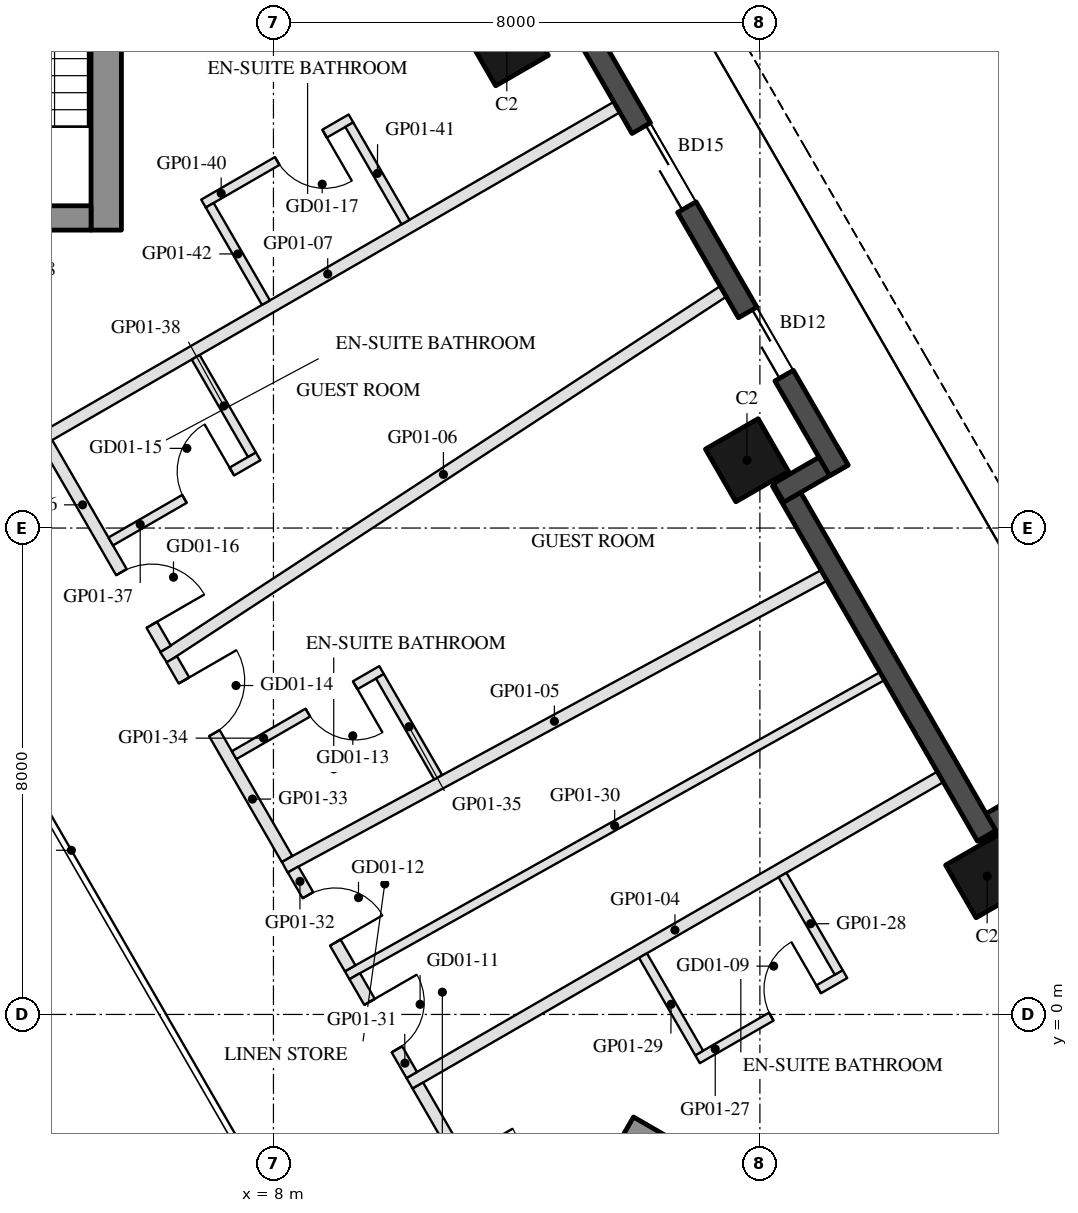
"""IFC4 building model, lengths in metres.
Left out: names, types, materials, properties, quantities, classifications, styles, units other than length and angle.
Written with IfcOpenShell. Run it as: python <this file> out.ifc"""

import sys

from ifc_helpers import new_model, si_unit, direction, frame, frame_2d, origin, origin_2d, place, context, subcontext, project, spatial, rectangle, hollow_rectangle, extrude, element, fill, save


model = new_model("IFC4")
c1 = context("Model", 3, precision=1e-05, world=origin(), true_north=direction((0.0, 1.0)))
c2 = subcontext(c1, "Body", "Model", "MODEL_VIEW")
j1 = project(units=[si_unit("LENGTHUNIT", "METRE"), si_unit("PLANEANGLEUNIT", "RADIAN")], contexts=[c1])
p1 = place(None, origin())
s1 = spatial("IfcSite", under=j1, at=p1, CompositionType="ELEMENT")
p2 = place(p1, origin())
s2 = spatial("IfcBuilding", under=s1, at=p2, CompositionType="ELEMENT")
p3 = place(p2, frame((0.0, 0.0, 50.2)))
s3 = spatial("IfcBuildingStorey", under=s2, at=p3, CompositionType="ELEMENT", Elevation=50.2)
for number, where, z_axis, x_axis in (
    (1, (19.738, 2.273, 0.0), (0.0, 0.0, 1.0), (-0.5, 0.866, 0.0)),
    (2, (15.788, 9.115, 0.0), (0.0, 0.0, 1.0), (-0.5, 0.866, 0.0)),
    (3, (11.838, 15.957, 0.0), (0.0, 0.0, 1.0), (-0.5, 0.866, 0.0)),
):
    element("IfcColumn", number, at=place(p3, frame(where, z_axis=z_axis, x_axis=x_axis)), inside=s3, PredefinedType="COLUMN", context=c2, shape_type="SweptSolid", body=[
        extrude(hollow_rectangle(XDim=1.0, YDim=1.0, WallThickness=0.045, at=origin_2d()), origin(), (0.0, 0.0, 1.0), 3.7),
    ])
p4 = place(p3, frame((20.588, 3.601, 0.0), z_axis=(0.0, 0.0, 1.0), x_axis=(-0.866005645448, -0.500034220881, 0.0)))
e4 = element("IfcWall", 4, at=p4, inside=s3, PredefinedType="SOLIDWALL", context=c2, shape_type="SweptSolid", body=[
    extrude(rectangle(XDim=1.22, YDim=0.35, at=frame_2d((0.61, 0.0))), origin(), (0.0, 0.0, 1.0), 3.55),
])
p5 = place(p3, frame((19.729, 2.938, 0.0), z_axis=(0.0, 0.0, 1.0), x_axis=(-0.499976430342, 0.866039011305, 0.0)))
e5 = element("IfcWall", 5, at=p5, inside=s3, PredefinedType="SOLIDWALL", context=c2, shape_type="SweptSolid", body=[
    extrude(rectangle(XDim=6.74, YDim=0.35, at=frame_2d((3.37, 0.0))), origin(), (0.0, 0.0, 1.0), 3.55),
])
p6 = place(p3, frame((16.306, 8.577, 0.0), z_axis=(0.0, 0.0, 1.0), x_axis=(0.866092288191, 0.499884134912, 0.0)))
e6 = element("IfcWall", 6, at=p6, inside=s3, PredefinedType="SOLIDWALL", context=c2, shape_type="SweptSolid", body=[
    extrude(rectangle(XDim=1.22, YDim=0.35, at=frame_2d((0.61, 0.0))), origin(), (0.0, 0.0, 1.0), 3.55),
])
p7 = place(p3, frame((17.299, 8.948, 0.0), z_axis=(0.0, 0.0, 1.0), x_axis=(-0.500010041276, 0.866019606374, 0.0)))
e7 = element("IfcWall", 7, at=p7, inside=s3, PredefinedType="SOLIDWALL", context=c2, shape_type="SweptSolid", body=[
    extrude(rectangle(XDim=9.7, YDim=0.35, at=frame_2d((4.85, 0.0))), origin(), (0.0, 0.0, 1.0), 3.55),
])
p8 = place(p7, frame((1.8, 0.0, 0.0)))
e8 = element("IfcOpeningElement", 8, at=p8, cuts=e7, PredefinedType="OPENING", context=c2, shape_type="SweptSolid", body=[
    extrude(rectangle(XDim=1.2, YDim=2.4, at=frame_2d((0.6, 1.2))), frame((0.0, 0.185, 0.0), z_axis=(0.0, -1.0, 0.0), x_axis=(1.0, 0.0, 0.0)), (0.0, 0.0, 1.0), 0.37),
])
p9 = place(p7, frame((5.0, 0.0, 0.0)))
e9 = element("IfcOpeningElement", 9, at=p9, cuts=e7, PredefinedType="OPENING", context=c2, shape_type="SweptSolid", body=[
    extrude(rectangle(XDim=1.5, YDim=2.4, at=frame_2d((0.75, 1.2))), frame((0.0, 0.185, 0.0), z_axis=(0.0, -1.0, 0.0), x_axis=(1.0, 0.0, 0.0)), (0.0, 0.0, 1.0), 0.37),
])
p10 = place(p3, frame((5.25, 12.9, 0.0), z_axis=(0.0, 0.0, 1.0), x_axis=(0.0, 1.0, 0.0)))
e10 = element("IfcWall", 10, at=p10, inside=s3, PredefinedType="SHEAR", context=c2, shape_type="SweptSolid", body=[
    extrude(rectangle(XDim=14.837, YDim=0.5, at=frame_2d((7.418, 0.0))), origin(), (0.0, 0.0, 1.0), 3.5),
])
p11 = place(p3, frame((5.0, 13.1, 0.0), z_axis=(0.0, 0.0, 1.0), x_axis=(-1.0, 0.0, 0.0)))
e11 = element("IfcWall", 11, at=p11, inside=s3, PredefinedType="SHEAR", context=c2, shape_type="SweptSolid", body=[
    extrude(rectangle(XDim=10.0, YDim=0.4, at=frame_2d((5.0, 0.0))), origin(), (0.0, 0.0, 1.0), 3.5),
])
p12 = place(p11, frame((3.55, 0.0, 0.0)))
e12 = element("IfcOpeningElement", 12, at=p12, cuts=e11, PredefinedType="OPENING", context=c2, shape_type="SweptSolid", body=[
    extrude(rectangle(XDim=1.1, YDim=2.1, at=frame_2d((0.55, 1.05))), frame((0.0, 0.21, 0.0), z_axis=(0.0, -1.0, 0.0), x_axis=(1.0, 0.0, 0.0)), (0.0, 0.0, 1.0), 0.42),
])
p13 = place(p11, frame((5.85, 0.0, 0.0)))
e13 = element("IfcOpeningElement", 13, at=p13, cuts=e11, PredefinedType="OPENING", context=c2, shape_type="SweptSolid", body=[
    extrude(rectangle(XDim=1.4, YDim=2.1, at=frame_2d((0.7, 1.05))), frame((0.0, 0.21, 0.0), z_axis=(0.0, -1.0, 0.0), x_axis=(1.0, 0.0, 0.0)), (0.0, 0.0, 1.0), 0.42),
])
p14 = place(p3, frame((13.797, -1.903, 0.0), z_axis=(0.0, 0.0, 1.0), x_axis=(0.866025009528, -0.500000682871, 0.0)))
e14 = element("IfcWall", 14, at=p14, inside=s3, PredefinedType="SHEAR", context=c2, shape_type="SweptSolid", body=[
    extrude(rectangle(XDim=14.837, YDim=0.5, at=frame_2d((7.418, 0.0))), origin(), (0.0, 0.0, 1.0), 3.5),
])
p15 = place(p3, frame((18.968, 3.907, 0.0), z_axis=(0.0, 0.0, 1.0), x_axis=(-0.866022637375, -0.500004791531, 0.0)))
e15 = element("IfcWall", 15, at=p15, inside=s3, PredefinedType="PARTITIONING", context=c2, shape_type="SweptSolid", body=[
    extrude(rectangle(XDim=10.08, YDim=0.2, at=frame_2d((5.04, 0.0))), origin(), (0.0, 0.0, 1.0), 2.96),
])
p16 = place(p3, frame((17.055, 7.22, 0.0), z_axis=(0.0, 0.0, 1.0), x_axis=(-0.87960357017, -0.475707430407, 0.0)))
e16 = element("IfcWall", 16, at=p16, inside=s3, PredefinedType="PARTITIONING", context=c2, shape_type="SweptSolid", body=[
    extrude(rectangle(XDim=10.084, YDim=0.2, at=frame_2d((5.042, 0.0))), origin(), (0.0, 0.0, 1.0), 2.96),
])
p17 = place(p3, frame((15.397, 11.892, 0.0), z_axis=(0.0, 0.0, 1.0), x_axis=(-0.836898817878, -0.547357624076, 0.0)))
e17 = element("IfcWall", 17, at=p17, inside=s3, PredefinedType="PARTITIONING", context=c2, shape_type="SweptSolid", body=[
    extrude(rectangle(XDim=10.997, YDim=0.2, at=frame_2d((5.499, 0.0))), origin(), (0.0, 0.0, 1.0), 2.96),
])
p18 = place(p3, frame((13.647, 14.923, 0.0), z_axis=(0.0, 0.0, 1.0), x_axis=(-0.866027479907, -0.499996404033, 0.0)))
e18 = element("IfcWall", 18, at=p18, inside=s3, PredefinedType="PARTITIONING", context=c2, shape_type="SweptSolid", body=[
    extrude(rectangle(XDim=10.98, YDim=0.2, at=frame_2d((5.49, 0.0))), origin(), (0.0, 0.0, 1.0), 2.96),
])
p19 = place(p3, frame((10.375, -1.169, 0.0), z_axis=(0.0, 0.0, 1.0), x_axis=(0.500055316652, -0.865993464345, 0.0)))
e19 = element("IfcWall", 19, at=p19, inside=s3, PredefinedType="PARTITIONING", context=c2, shape_type="SweptSolid", body=[
    extrude(rectangle(XDim=3.788, YDim=0.2, at=frame_2d((1.894, 0.0))), origin(), (0.0, 0.0, 1.0), 2.95),
])
p20 = place(p19, frame((1.394, 0.0, 0.0)))
e20 = element("IfcOpeningElement", 20, at=p20, cuts=e19, PredefinedType="OPENING", context=c2, shape_type="SweptSolid", body=[
    extrude(rectangle(XDim=1.0, YDim=2.1, at=frame_2d((0.5, 1.05))), frame((0.0, 0.11, 0.0), z_axis=(0.0, -1.0, 0.0), x_axis=(1.0, 0.0, 0.0)), (0.0, 0.0, 1.0), 0.22),
])
p21 = place(p3, frame((14.974, -0.737, 0.0), z_axis=(0.0, 0.0, 1.0), x_axis=(0.866018616679, 0.500011755427, 0.0)))
e21 = element("IfcWall", 21, at=p21, inside=s3, PredefinedType="PARTITIONING", context=c2, shape_type="SweptSolid", body=[
    extrude(rectangle(XDim=2.8, YDim=0.15, at=frame_2d((1.4, 0.0))), origin(), (0.0, 0.0, 1.0), 3.55),
])
p22 = place(p21, frame((1.4, 0.0, 0.0)))
e22 = element("IfcOpeningElement", 22, at=p22, cuts=e21, PredefinedType="OPENING", context=c2, shape_type="SweptSolid", body=[
    extrude(rectangle(XDim=0.9, YDim=2.1, at=frame_2d((0.45, 1.05))), frame((0.0, 0.085, 0.0), z_axis=(0.0, -1.0, 0.0), x_axis=(1.0, 0.0, 0.0)), (0.0, 0.0, 1.0), 0.17),
])
p23 = place(p3, frame((17.297, 0.691, 0.0), z_axis=(0.0, 0.0, 1.0), x_axis=(-0.499985172903, 0.866033964044, 0.0)))
e23 = element("IfcWall", 23, at=p23, inside=s3, PredefinedType="PARTITIONING", context=c2, shape_type="SweptSolid", body=[
    extrude(rectangle(XDim=1.85, YDim=0.15, at=frame_2d((0.925, 0.0))), origin(), (0.0, 0.0, 1.0), 2.95),
])
p24 = place(p3, frame((15.002, -0.634, 0.0), z_axis=(0.0, 0.0, 1.0), x_axis=(-0.500042316284, 0.866000971088, 0.0)))
e24 = element("IfcWall", 24, at=p24, inside=s3, PredefinedType="PARTITIONING", context=c2, shape_type="SweptSolid", body=[
    extrude(rectangle(XDim=1.85, YDim=0.15, at=frame_2d((0.925, 0.0))), origin(), (0.0, 0.0, 1.0), 2.95),
])
p25 = place(p3, frame((18.011, 5.563, 0.0), z_axis=(0.0, 0.0, 1.0), x_axis=(-0.872898889426, -0.487901146585, 0.0)))
e25 = element("IfcWall", 25, at=p25, inside=s3, PredefinedType="PARTITIONING", context=c2, shape_type="SweptSolid", body=[
    extrude(rectangle(XDim=10.081, YDim=0.15, at=frame_2d((5.041, 0.0))), origin(), (0.0, 0.0, 1.0), 2.95),
])
p26 = place(p3, frame((9.336, 0.629, 0.0), z_axis=(0.0, 0.0, 1.0), x_axis=(0.500015282227, -0.866016580407, 0.0)))
e26 = element("IfcWall", 26, at=p26, inside=s3, PredefinedType="PARTITIONING", context=c2, shape_type="SweptSolid", body=[
    extrude(rectangle(XDim=1.876, YDim=0.2, at=frame_2d((0.938, 0.0))), origin(), (0.0, 0.0, 1.0), 3.55),
])
p27 = place(p26, frame((0.488, 0.0, 0.0)))
e27 = element("IfcOpeningElement", 27, at=p27, cuts=e26, PredefinedType="OPENING", context=c2, shape_type="SweptSolid", body=[
    extrude(rectangle(XDim=0.9, YDim=2.1, at=frame_2d((0.45, 1.05))), frame((0.0, 0.11, 0.0), z_axis=(0.0, -1.0, 0.0), x_axis=(1.0, 0.0, 0.0)), (0.0, 0.0, 1.0), 0.22),
])
p28 = place(p3, frame((8.323, 2.384, 0.0), z_axis=(0.0, 0.0, 1.0), x_axis=(0.500015282227, -0.866016580407, 0.0)))
e28 = element("IfcWall", 28, at=p28, inside=s3, PredefinedType="PARTITIONING", context=c2, shape_type="SweptSolid", body=[
    extrude(rectangle(XDim=1.876, YDim=0.2, at=frame_2d((0.938, 0.0))), origin(), (0.0, 0.0, 1.0), 2.95),
])
p29 = place(p28, frame((0.488, 0.0, 0.0)))
e29 = element("IfcOpeningElement", 29, at=p29, cuts=e28, PredefinedType="OPENING", context=c2, shape_type="SweptSolid", body=[
    extrude(rectangle(XDim=0.9, YDim=2.1, at=frame_2d((0.45, 1.05))), frame((0.0, 0.11, 0.0), z_axis=(0.0, -1.0, 0.0), x_axis=(1.0, 0.0, 0.0)), (0.0, 0.0, 1.0), 0.22),
])
p30 = place(p3, frame((6.327, 5.841, 0.0), z_axis=(0.0, 0.0, 1.0), x_axis=(0.499982560684, -0.866035472144, 0.0)))
e30 = element("IfcWall", 30, at=p30, inside=s3, PredefinedType="PARTITIONING", context=c2, shape_type="SweptSolid", body=[
    extrude(rectangle(XDim=3.792, YDim=0.2, at=frame_2d((1.896, 0.0))), origin(), (0.0, 0.0, 1.0), 2.95),
])
p31 = place(p30, frame((0.401, 0.0, 0.0)))
e31 = element("IfcOpeningElement", 31, at=p31, cuts=e30, PredefinedType="OPENING", context=c2, shape_type="SweptSolid", body=[
    extrude(rectangle(XDim=1.0, YDim=2.1, at=frame_2d((0.5, 1.05))), frame((0.0, 0.11, 0.0), z_axis=(0.0, -1.0, 0.0), x_axis=(1.0, 0.0, 0.0)), (0.0, 0.0, 1.0), 0.22),
])
p32 = place(p3, frame((9.778, 5.664, 0.0), z_axis=(0.0, 0.0, 1.0), x_axis=(-0.866034573852, -0.49998411664, 0.0)))
e32 = element("IfcWall", 32, at=p32, inside=s3, PredefinedType="PARTITIONING", context=c2, shape_type="SweptSolid", body=[
    extrude(rectangle(XDim=2.8, YDim=0.15, at=frame_2d((1.4, 0.0))), origin(), (0.0, 0.0, 1.0), 2.95),
])
p33 = place(p32, frame((0.5, 0.0, 0.0)))
e33 = element("IfcOpeningElement", 33, at=p33, cuts=e32, PredefinedType="OPENING", context=c2, shape_type="SweptSolid", body=[
    extrude(rectangle(XDim=0.9, YDim=2.1, at=frame_2d((0.45, 1.05))), frame((0.0, 0.085, 0.0), z_axis=(0.0, -1.0, 0.0), x_axis=(1.0, 0.0, 0.0)), (0.0, 0.0, 1.0), 0.17),
])
p34 = place(p3, frame((10.709, 3.901, 0.0), z_axis=(0.0, 0.0, 1.0), x_axis=(-0.499946593449, 0.866056235875, 0.0)))
e34 = element("IfcWall", 34, at=p34, inside=s3, PredefinedType="PARTITIONING", context=c2, shape_type="SweptSolid", body=[
    extrude(rectangle(XDim=1.917, YDim=0.15, at=frame_2d((0.958, 0.0))), origin(), (0.0, 0.0, 1.0), 2.95),
])
p35 = place(p3, frame((4.275, 9.396, 0.0), z_axis=(0.0, 0.0, 1.0), x_axis=(0.499971370958, -0.866041932139, 0.0)))
e35 = element("IfcWall", 35, at=p35, inside=s3, PredefinedType="PARTITIONING", context=c2, shape_type="SweptSolid", body=[
    extrude(rectangle(XDim=3.906, YDim=0.2, at=frame_2d((1.953, 0.0))), origin(), (0.0, 0.0, 1.0), 2.95),
])
p36 = place(p35, frame((2.45, 0.0, 0.0)))
e36 = element("IfcOpeningElement", 36, at=p36, cuts=e35, PredefinedType="OPENING", context=c2, shape_type="SweptSolid", body=[
    extrude(rectangle(XDim=1.0, YDim=2.1, at=frame_2d((0.5, 1.05))), frame((0.0, 0.11, 0.0), z_axis=(0.0, -1.0, 0.0), x_axis=(1.0, 0.0, 0.0)), (0.0, 0.0, 1.0), 0.22),
])
p37 = place(p3, frame((5.324, 7.779, 0.0), z_axis=(0.0, 0.0, 1.0), x_axis=(0.865996816683, 0.500049511043, 0.0)))
e37 = element("IfcWall", 37, at=p37, inside=s3, PredefinedType="PARTITIONING", context=c2, shape_type="SweptSolid", body=[
    extrude(rectangle(XDim=2.8, YDim=0.15, at=frame_2d((1.4, 0.0))), origin(), (0.0, 0.0, 1.0), 2.95),
])
p38 = place(p37, frame((1.4, 0.0, 0.0)))
e38 = element("IfcOpeningElement", 38, at=p38, cuts=e37, PredefinedType="OPENING", context=c2, shape_type="SweptSolid", body=[
    extrude(rectangle(XDim=0.9, YDim=2.1, at=frame_2d((0.45, 1.05))), frame((0.0, 0.085, 0.0), z_axis=(0.0, -1.0, 0.0), x_axis=(1.0, 0.0, 0.0)), (0.0, 0.0, 1.0), 0.17),
])
p39 = place(p3, frame((7.646, 9.207, 0.0), z_axis=(0.0, 0.0, 1.0), x_axis=(-0.49994333299, 0.866058118026, 0.0)))
e39 = element("IfcWall", 39, at=p39, inside=s3, PredefinedType="PARTITIONING", context=c2, shape_type="SweptSolid", body=[
    extrude(rectangle(XDim=1.85, YDim=0.15, at=frame_2d((0.925, 0.0))), origin(), (0.0, 0.0, 1.0), 3.55),
])
p40 = place(p3, frame((9.274, 14.737, 0.0), z_axis=(0.0, 0.0, 1.0), x_axis=(-0.866018616679, -0.500011755427, 0.0)))
e40 = element("IfcWall", 40, at=p40, inside=s3, PredefinedType="PARTITIONING", context=c2, shape_type="SweptSolid", body=[
    extrude(rectangle(XDim=2.8, YDim=0.15, at=frame_2d((1.4, 0.0))), origin(), (0.0, 0.0, 1.0), 3.55),
])
p41 = place(p40, frame((0.5, 0.0, 0.0)))
e41 = element("IfcOpeningElement", 41, at=p41, cuts=e40, PredefinedType="OPENING", context=c2, shape_type="SweptSolid", body=[
    extrude(rectangle(XDim=0.9, YDim=2.1, at=frame_2d((0.45, 1.05))), frame((0.0, 0.085, 0.0), z_axis=(0.0, -1.0, 0.0), x_axis=(1.0, 0.0, 0.0)), (0.0, 0.0, 1.0), 0.17),
])
p42 = place(p3, frame((10.172, 13.032, 0.0), z_axis=(0.0, 0.0, 1.0), x_axis=(-0.500042316284, 0.866000971088, 0.0)))
e42 = element("IfcWall", 42, at=p42, inside=s3, PredefinedType="PARTITIONING", context=c2, shape_type="SweptSolid", body=[
    extrude(rectangle(XDim=1.85, YDim=0.15, at=frame_2d((0.925, 0.0))), origin(), (0.0, 0.0, 1.0), 2.95),
])
p43 = place(p3, frame((7.877, 11.707, 0.0), z_axis=(0.0, 0.0, 1.0), x_axis=(-0.499985172903, 0.866033964044, 0.0)))
e43 = element("IfcWall", 43, at=p43, inside=s3, PredefinedType="PARTITIONING", context=c2, shape_type="SweptSolid", body=[
    extrude(rectangle(XDim=1.85, YDim=0.15, at=frame_2d((0.925, 0.0))), origin(), (0.0, 0.0, 1.0), 2.95),
])
p44 = place(p8, frame((1.2, 0.0, 0.0), z_axis=(0.0, 0.0, 1.0), x_axis=(-1.0, 0.0, 0.0)))
e44 = element("IfcDoor", 44, at=p44, inside=s3, OperationType="SLIDING_TO_LEFT", PredefinedType="DOOR", context=c2, shape_type="SweptSolid", body=[
    extrude(rectangle(XDim=1.2, YDim=2.4, at=frame_2d((0.6, 1.2))), frame((0.0, 0.025, 0.0), z_axis=(0.0, -1.0, 0.0), x_axis=(1.0, 0.0, 0.0)), (0.0, 0.0, 1.0), 0.05),
])
fill(e8, e44)
p45 = place(p9, frame((1.5, 0.0, 0.0), z_axis=(0.0, 0.0, 1.0), x_axis=(-1.0, 0.0, 0.0)))
e45 = element("IfcDoor", 45, at=p45, inside=s3, OperationType="SLIDING_TO_LEFT", PredefinedType="DOOR", context=c2, shape_type="SweptSolid", body=[
    extrude(rectangle(XDim=1.5, YDim=2.4, at=frame_2d((0.75, 1.2))), frame((0.0, 0.025, 0.0), z_axis=(0.0, -1.0, 0.0), x_axis=(1.0, 0.0, 0.0)), (0.0, 0.0, 1.0), 0.05),
])
fill(e9, e45)
p46 = place(p22, origin())
e46 = element("IfcDoor", 46, at=p46, inside=s3, OperationType="SINGLE_SWING_RIGHT", PredefinedType="DOOR", context=c2, shape_type="SweptSolid", body=[
    extrude(rectangle(XDim=0.9, YDim=2.1, at=frame_2d((0.45, 1.05))), frame((0.0, 0.025, 0.0), z_axis=(0.0, -1.0, 0.0), x_axis=(1.0, 0.0, 0.0)), (0.0, 0.0, 1.0), 0.05),
])
fill(e22, e46)
p47 = place(p27, origin())
e47 = element("IfcDoor", 47, at=p47, inside=s3, OperationType="SINGLE_SWING_LEFT", PredefinedType="DOOR", context=c2, shape_type="SweptSolid", body=[
    extrude(rectangle(XDim=0.9, YDim=2.1, at=frame_2d((0.45, 1.05))), frame((0.0, 0.025, 0.0), z_axis=(0.0, -1.0, 0.0), x_axis=(1.0, 0.0, 0.0)), (0.0, 0.0, 1.0), 0.05),
])
fill(e27, e47)
p48 = place(p29, origin())
e48 = element("IfcDoor", 48, at=p48, inside=s3, OperationType="SINGLE_SWING_RIGHT", PredefinedType="DOOR", context=c2, shape_type="SweptSolid", body=[
    extrude(rectangle(XDim=0.9, YDim=2.1, at=frame_2d((0.45, 1.05))), frame((0.0, 0.025, 0.0), z_axis=(0.0, -1.0, 0.0), x_axis=(1.0, 0.0, 0.0)), (0.0, 0.0, 1.0), 0.05),
])
fill(e29, e48)
p49 = place(p33, origin())
e49 = element("IfcDoor", 49, at=p49, inside=s3, OperationType="SINGLE_SWING_LEFT", PredefinedType="DOOR", context=c2, shape_type="SweptSolid", body=[
    extrude(rectangle(XDim=0.9, YDim=2.1, at=frame_2d((0.45, 1.05))), frame((0.0, 0.025, 0.0), z_axis=(0.0, -1.0, 0.0), x_axis=(1.0, 0.0, 0.0)), (0.0, 0.0, 1.0), 0.05),
])
fill(e33, e49)
p50 = place(p31, origin())
e50 = element("IfcDoor", 50, at=p50, inside=s3, OperationType="SINGLE_SWING_LEFT", PredefinedType="DOOR", context=c2, shape_type="SweptSolid", body=[
    extrude(rectangle(XDim=1.0, YDim=2.1, at=frame_2d((0.5, 1.05))), frame((0.0, 0.025, 0.0), z_axis=(0.0, -1.0, 0.0), x_axis=(1.0, 0.0, 0.0)), (0.0, 0.0, 1.0), 0.05),
])
fill(e31, e50)
p51 = place(p38, origin())
e51 = element("IfcDoor", 51, at=p51, inside=s3, OperationType="SINGLE_SWING_RIGHT", PredefinedType="DOOR", context=c2, shape_type="SweptSolid", body=[
    extrude(rectangle(XDim=0.9, YDim=2.1, at=frame_2d((0.45, 1.05))), frame((0.0, 0.025, 0.0), z_axis=(0.0, -1.0, 0.0), x_axis=(1.0, 0.0, 0.0)), (0.0, 0.0, 1.0), 0.05),
])
fill(e38, e51)
p52 = place(p36, origin())
e52 = element("IfcDoor", 52, at=p52, inside=s3, OperationType="SINGLE_SWING_RIGHT", PredefinedType="DOOR", context=c2, shape_type="SweptSolid", body=[
    extrude(rectangle(XDim=1.0, YDim=2.1, at=frame_2d((0.5, 1.05))), frame((0.0, 0.025, 0.0), z_axis=(0.0, -1.0, 0.0), x_axis=(1.0, 0.0, 0.0)), (0.0, 0.0, 1.0), 0.05),
])
fill(e36, e52)
p53 = place(p41, origin())
e53 = element("IfcDoor", 53, at=p53, inside=s3, OperationType="SINGLE_SWING_LEFT", PredefinedType="DOOR", context=c2, shape_type="SweptSolid", body=[
    extrude(rectangle(XDim=0.9, YDim=2.1, at=frame_2d((0.45, 1.05))), frame((0.0, 0.025, 0.0), z_axis=(0.0, -1.0, 0.0), x_axis=(1.0, 0.0, 0.0)), (0.0, 0.0, 1.0), 0.05),
])
fill(e41, e53)
save(model, sys.argv[1])
